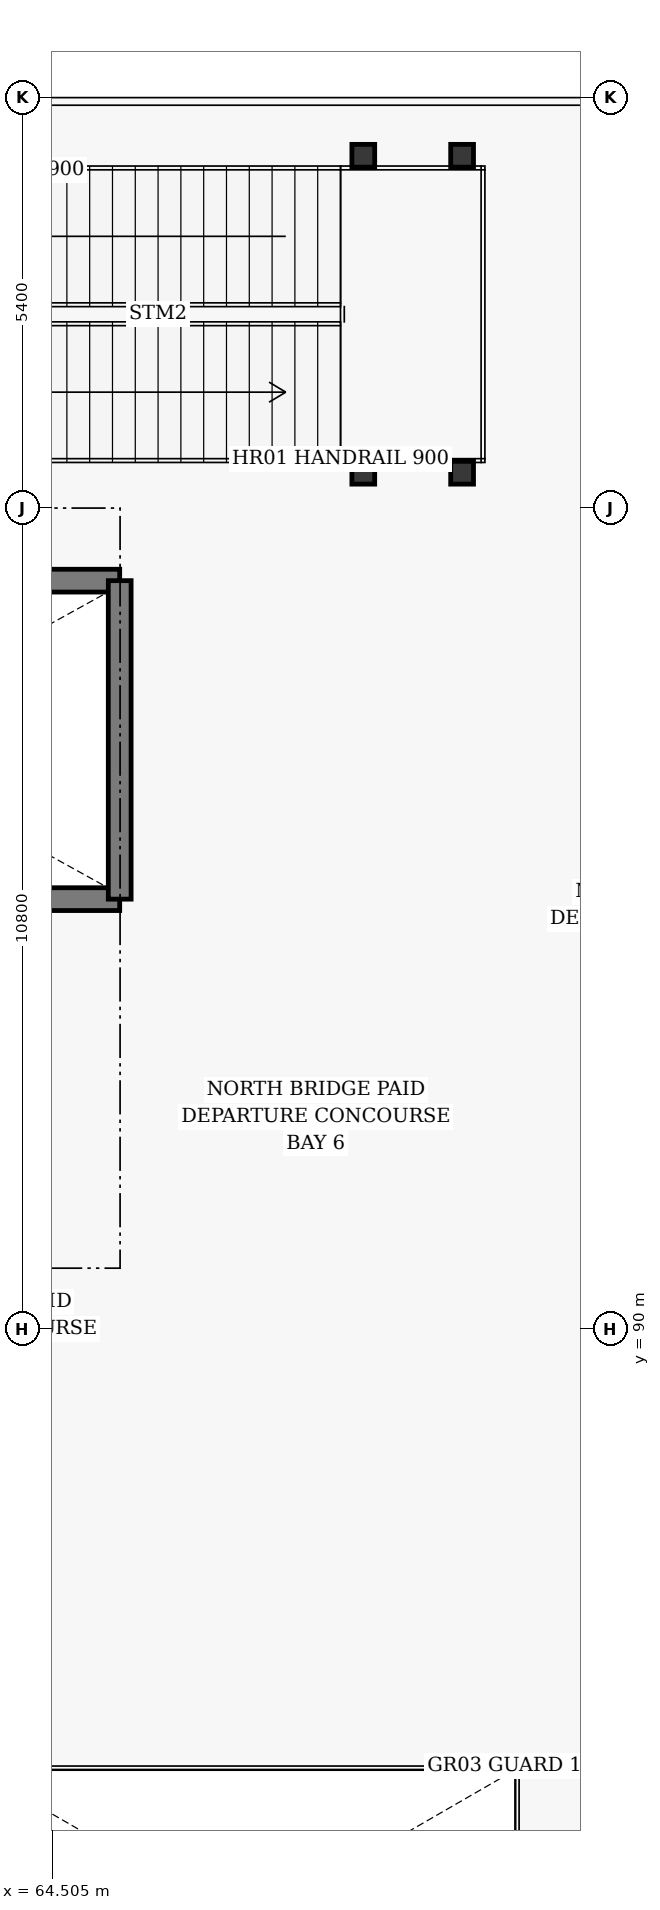
"""IFC4 building model, lengths in metres.
Left out: names, types, materials, properties, quantities, classifications, styles, units other than length and angle.
Written with IfcOpenShell. Run it as: python <this file> out.ifc"""

import sys

from ifc_helpers import new_model, si_unit, direction, frame, frame_2d, origin, origin_2d, place, context, subcontext, project, spatial, rectangle, i_section, extrude, element, save


model = new_model("IFC4")
c1 = context("Model", 3, precision=1e-05, world=origin(), true_north=direction((0.0, 1.0)))
c2 = subcontext(c1, "Body", "Model", "MODEL_VIEW")
j1 = project(units=[si_unit("LENGTHUNIT", "METRE"), si_unit("PLANEANGLEUNIT", "RADIAN")], contexts=[c1])
p1 = place(None, origin())
s1 = spatial("IfcSite", under=j1, at=p1, CompositionType="ELEMENT")
p2 = place(p1, origin())
s2 = spatial("IfcBuilding", under=s1, at=p2, CompositionType="ELEMENT")
p3 = place(p2, frame((0.0, 0.0, 6.6)))
s3 = spatial("IfcBuildingStorey", under=s2, at=p3, CompositionType="ELEMENT", Elevation=6.6)
p4 = place(p3, frame((55.355, 95.655, 0.0), z_axis=(0.0, 0.0, 1.0), x_axis=(1.0, 0.0, 0.0)))
e1 = element("IfcWall", 1, at=p4, inside=s3, PredefinedType="SOLIDWALL", context=c2, shape_type="SweptSolid", body=[
    extrude(rectangle(XDim=10.04, YDim=0.3, at=frame_2d((5.02, 0.0))), origin(), (0.0, 0.0, 1.0), 6.0),
])
p5 = place(p4, frame((0.35, 0.0, 0.005)))
e2 = element("IfcOpeningElement", 2, at=p5, cuts=e1, PredefinedType="OPENING", context=c2, shape_type="SweptSolid", body=[
    extrude(rectangle(XDim=1.9, YDim=2.2, at=frame_2d((0.95, 1.1))), frame((0.0, 0.162, 0.0), z_axis=(0.0, -1.0, 0.0), x_axis=(1.0, 0.0, 0.0)), (0.0, 0.0, 1.0), 0.324),
])
p6 = place(p3, frame((55.355, 99.845, 0.0), z_axis=(0.0, 0.0, 1.0), x_axis=(1.0, 0.0, 0.0)))
e3 = element("IfcWall", 3, at=p6, inside=s3, PredefinedType="SOLIDWALL", context=c2, shape_type="SweptSolid", body=[
    extrude(rectangle(XDim=10.04, YDim=0.3, at=frame_2d((5.02, 0.0))), origin(), (0.0, 0.0, 1.0), 6.0),
])
p7 = place(p3, frame((65.395, 95.655, 0.0), z_axis=(0.0, 0.0, 1.0), x_axis=(0.0, 1.0, 0.0)))
e4 = element("IfcWall", 4, at=p7, inside=s3, PredefinedType="SOLIDWALL", context=c2, shape_type="SweptSolid", body=[
    extrude(rectangle(XDim=4.19, YDim=0.3, at=frame_2d((2.095, 0.0))), origin(), (0.0, 0.0, 1.0), 6.0),
])
for number, where, z_axis, x_axis in (
    (5, (68.6, 101.265, -0.02), (0.0, 0.0, 1.0), (1.0, 0.0, 0.0)),
    (6, (69.9, 101.265, -0.02), (0.0, 0.0, 1.0), (1.0, 0.0, 0.0)),
    (7, (68.6, 105.435, -0.02), (0.0, 0.0, 1.0), (1.0, 0.0, 0.0)),
    (8, (69.9, 105.435, -0.02), (0.0, 0.0, 1.0), (1.0, 0.0, 0.0)),
):
    element("IfcColumn", number, at=place(p3, frame(where, z_axis=z_axis, x_axis=x_axis)), inside=s3, PredefinedType="COLUMN", context=c2, shape_type="SweptSolid", body=[
        extrude(i_section(OverallWidth=0.3, OverallDepth=0.3, WebThickness=0.011, FlangeThickness=0.019, at=origin_2d()), origin(), (0.0, 0.0, 1.0), 3.0),
    ])
save(model, sys.argv[1])
